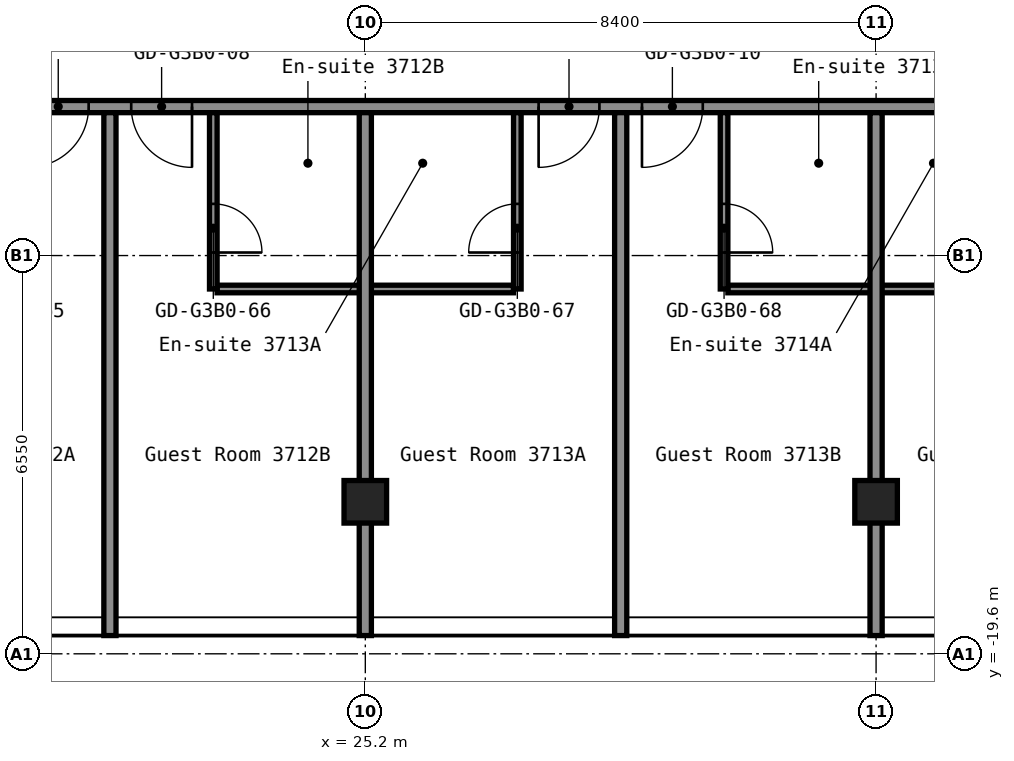
"""IFC4 building model, lengths in metres.
Left out: names, types, materials, properties, quantities, classifications, styles, units other than length and angle.
Written with IfcOpenShell. Run it as: python <this file> out.ifc"""

import sys

from ifc_helpers import new_model, si_unit, direction, frame, frame_2d, origin, origin_2d, place, context, subcontext, project, spatial, rectangle, hollow_rectangle, extrude, element, fill, save


model = new_model("IFC4")
c1 = context("Model", 3, precision=1e-05, world=origin(), true_north=direction((0.0, 1.0)))
c2 = subcontext(c1, "Body", "Model", "MODEL_VIEW")
j1 = project(units=[si_unit("LENGTHUNIT", "METRE"), si_unit("PLANEANGLEUNIT", "RADIAN")], contexts=[c1])
p1 = place(None, origin())
s1 = spatial("IfcSite", under=j1, at=p1, CompositionType="ELEMENT")
p2 = place(p1, origin())
s2 = spatial("IfcBuilding", under=s1, at=p2, CompositionType="ELEMENT")
p3 = place(p2, frame((0.0, 0.0, 134.2)))
s3 = spatial("IfcBuildingStorey", under=s2, at=p3, CompositionType="ELEMENT", Elevation=134.2)
for number, where, z_axis, x_axis in (
    (1, (25.2, -17.1, 0.0), (0.0, 0.0, 1.0), (1.0, 0.0, 0.0)),
    (2, (33.6, -17.1, 0.0), (0.0, 0.0, 1.0), (1.0, 0.0, 0.0)),
):
    element("IfcColumn", number, at=place(p3, frame(where, z_axis=z_axis, x_axis=x_axis)), inside=s3, PredefinedType="COLUMN", context=c2, shape_type="SweptSolid", body=[
        extrude(hollow_rectangle(XDim=0.7, YDim=0.7, WallThickness=0.028, at=origin_2d()), origin(), (0.0, 0.0, 1.0), 2.75),
    ])
for number, where, z_axis, x_axis in (
    (3, (22.762, -13.6, 0.0), (0.0, 0.0, 1.0), (1.0, 0.0, 0.0)),
    (4, (31.163, -13.6, 0.0), (0.0, 0.0, 1.0), (1.0, 0.0, 0.0)),
):
    element("IfcWall", number, at=place(p3, frame(where, z_axis=z_axis, x_axis=x_axis)), inside=s3, PredefinedType="PARTITIONING", context=c2, shape_type="SweptSolid", body=[
        extrude(rectangle(XDim=4.875, YDim=0.125, at=frame_2d((2.438, 0.0))), origin(), (0.0, 0.0, 1.0), 2.75),
    ])
p4 = place(p3, frame((16.8, -10.6, 0.0), z_axis=(0.0, 0.0, 1.0), x_axis=(1.0, 0.0, 0.0)))
e5 = element("IfcWall", 5, at=p4, inside=s3, PredefinedType="PARTITIONING", context=c2, shape_type="SweptSolid", body=[
    extrude(rectangle(XDim=25.9, YDim=0.2, at=frame_2d((12.95, 0.0))), origin(), (0.0, 0.0, 1.0), 2.75),
])
p5 = place(p4, frame((2.85, 0.0, 0.0)))
e6 = element("IfcOpeningElement", 6, at=p5, cuts=e5, PredefinedType="OPENING", context=c2, shape_type="SweptSolid", body=[
    extrude(rectangle(XDim=1.0, YDim=2.1, at=frame_2d((0.5, 1.05))), frame((0.0, 0.11, 0.0), z_axis=(0.0, -1.0, 0.0), x_axis=(1.0, 0.0, 0.0)), (0.0, 0.0, 1.0), 0.22),
])
p6 = place(p4, frame((4.55, 0.0, 0.0)))
e7 = element("IfcOpeningElement", 7, at=p6, cuts=e5, PredefinedType="OPENING", context=c2, shape_type="SweptSolid", body=[
    extrude(rectangle(XDim=1.0, YDim=2.1, at=frame_2d((0.5, 1.05))), frame((0.0, 0.11, 0.0), z_axis=(0.0, -1.0, 0.0), x_axis=(1.0, 0.0, 0.0)), (0.0, 0.0, 1.0), 0.22),
])
p7 = place(p4, frame((11.25, 0.0, 0.0)))
e8 = element("IfcOpeningElement", 8, at=p7, cuts=e5, PredefinedType="OPENING", context=c2, shape_type="SweptSolid", body=[
    extrude(rectangle(XDim=1.0, YDim=2.1, at=frame_2d((0.5, 1.05))), frame((0.0, 0.11, 0.0), z_axis=(0.0, -1.0, 0.0), x_axis=(1.0, 0.0, 0.0)), (0.0, 0.0, 1.0), 0.22),
])
p8 = place(p4, frame((12.95, 0.0, 0.0)))
e9 = element("IfcOpeningElement", 9, at=p8, cuts=e5, PredefinedType="OPENING", context=c2, shape_type="SweptSolid", body=[
    extrude(rectangle(XDim=1.0, YDim=2.1, at=frame_2d((0.5, 1.05))), frame((0.0, 0.11, 0.0), z_axis=(0.0, -1.0, 0.0), x_axis=(1.0, 0.0, 0.0)), (0.0, 0.0, 1.0), 0.22),
])
p9 = place(p4, frame((19.75, 0.0, 0.0)))
e10 = element("IfcOpeningElement", 10, at=p9, cuts=e5, PredefinedType="OPENING", context=c2, shape_type="SweptSolid", body=[
    extrude(rectangle(XDim=1.0, YDim=2.1, at=frame_2d((0.5, 1.05))), frame((0.0, 0.11, 0.0), z_axis=(0.0, -1.0, 0.0), x_axis=(1.0, 0.0, 0.0)), (0.0, 0.0, 1.0), 0.22),
])
p10 = place(p4, frame((21.65, 0.0, 0.0)))
e11 = element("IfcOpeningElement", 11, at=p10, cuts=e5, PredefinedType="OPENING", context=c2, shape_type="SweptSolid", body=[
    extrude(rectangle(XDim=1.0, YDim=2.1, at=frame_2d((0.5, 1.05))), frame((0.0, 0.11, 0.0), z_axis=(0.0, -1.0, 0.0), x_axis=(1.0, 0.0, 0.0)), (0.0, 0.0, 1.0), 0.22),
])
p11 = place(p3, frame((21.0, -19.3, 0.0), z_axis=(0.0, 0.0, 1.0), x_axis=(0.0, 1.0, 0.0)))
e12 = element("IfcWall", 12, at=p11, inside=s3, PredefinedType="PARTITIONING", context=c2, shape_type="SweptSolid", body=[
    extrude(rectangle(XDim=8.6, YDim=0.2, at=frame_2d((4.3, 0.0))), origin(), (0.0, 0.0, 1.0), 2.75),
])
p12 = place(p3, frame((22.7, -13.6, 0.0), z_axis=(0.0, 0.0, 1.0), x_axis=(0.0, 1.0, 0.0)))
e13 = element("IfcWall", 13, at=p12, inside=s3, PredefinedType="PARTITIONING", context=c2, shape_type="SweptSolid", body=[
    extrude(rectangle(XDim=2.9, YDim=0.125, at=frame_2d((1.45, 0.0))), origin(), (0.0, 0.0, 1.0), 2.75),
])
p13 = place(p12, frame((0.6, 0.0, 0.0)))
e14 = element("IfcOpeningElement", 14, at=p13, cuts=e13, PredefinedType="OPENING", context=c2, shape_type="SweptSolid", body=[
    extrude(rectangle(XDim=0.8, YDim=2.1, at=frame_2d((0.4, 1.05))), frame((0.0, 0.073, 0.0), z_axis=(0.0, -1.0, 0.0), x_axis=(1.0, 0.0, 0.0)), (0.0, 0.0, 1.0), 0.145),
])
p14 = place(p3, frame((25.2, -19.3, 0.0), z_axis=(0.0, 0.0, 1.0), x_axis=(0.0, 1.0, 0.0)))
e15 = element("IfcWall", 15, at=p14, inside=s3, PredefinedType="PARTITIONING", context=c2, shape_type="SweptSolid", body=[
    extrude(rectangle(XDim=8.6, YDim=0.2, at=frame_2d((4.3, 0.0))), origin(), (0.0, 0.0, 1.0), 2.75),
])
p15 = place(p3, frame((27.7, -13.6, 0.0), z_axis=(0.0, 0.0, 1.0), x_axis=(0.0, 1.0, 0.0)))
e16 = element("IfcWall", 16, at=p15, inside=s3, PredefinedType="PARTITIONING", context=c2, shape_type="SweptSolid", body=[
    extrude(rectangle(XDim=2.9, YDim=0.125, at=frame_2d((1.45, 0.0))), origin(), (0.0, 0.0, 1.0), 2.75),
])
p16 = place(p15, frame((0.6, 0.0, 0.0)))
e17 = element("IfcOpeningElement", 17, at=p16, cuts=e16, PredefinedType="OPENING", context=c2, shape_type="SweptSolid", body=[
    extrude(rectangle(XDim=0.8, YDim=2.1, at=frame_2d((0.4, 1.05))), frame((0.0, 0.073, 0.0), z_axis=(0.0, -1.0, 0.0), x_axis=(1.0, 0.0, 0.0)), (0.0, 0.0, 1.0), 0.145),
])
p17 = place(p3, frame((29.4, -19.3, 0.0), z_axis=(0.0, 0.0, 1.0), x_axis=(0.0, 1.0, 0.0)))
e18 = element("IfcWall", 18, at=p17, inside=s3, PredefinedType="PARTITIONING", context=c2, shape_type="SweptSolid", body=[
    extrude(rectangle(XDim=8.6, YDim=0.2, at=frame_2d((4.3, 0.0))), origin(), (0.0, 0.0, 1.0), 2.75),
])
p18 = place(p3, frame((31.1, -13.6, 0.0), z_axis=(0.0, 0.0, 1.0), x_axis=(0.0, 1.0, 0.0)))
e19 = element("IfcWall", 19, at=p18, inside=s3, PredefinedType="PARTITIONING", context=c2, shape_type="SweptSolid", body=[
    extrude(rectangle(XDim=2.9, YDim=0.125, at=frame_2d((1.45, 0.0))), origin(), (0.0, 0.0, 1.0), 2.75),
])
p19 = place(p18, frame((0.6, 0.0, 0.0)))
e20 = element("IfcOpeningElement", 20, at=p19, cuts=e19, PredefinedType="OPENING", context=c2, shape_type="SweptSolid", body=[
    extrude(rectangle(XDim=0.8, YDim=2.1, at=frame_2d((0.4, 1.05))), frame((0.0, 0.073, 0.0), z_axis=(0.0, -1.0, 0.0), x_axis=(1.0, 0.0, 0.0)), (0.0, 0.0, 1.0), 0.145),
])
p20 = place(p3, frame((33.6, -19.3, 0.0), z_axis=(0.0, 0.0, 1.0), x_axis=(0.0, 1.0, 0.0)))
e21 = element("IfcWall", 21, at=p20, inside=s3, PredefinedType="PARTITIONING", context=c2, shape_type="SweptSolid", body=[
    extrude(rectangle(XDim=8.6, YDim=0.2, at=frame_2d((4.3, 0.0))), origin(), (0.0, 0.0, 1.0), 2.75),
])
p21 = place(p5, origin())
e22 = element("IfcDoor", 22, at=p21, inside=s3, OperationType="SINGLE_SWING_LEFT", PredefinedType="DOOR", context=c2, shape_type="SweptSolid", body=[
    extrude(rectangle(XDim=1.0, YDim=2.1, at=frame_2d((0.5, 1.05))), frame((0.0, 0.025, 0.0), z_axis=(0.0, -1.0, 0.0), x_axis=(1.0, 0.0, 0.0)), (0.0, 0.0, 1.0), 0.05),
])
fill(e6, e22)
p22 = place(p6, origin())
e23 = element("IfcDoor", 23, at=p22, inside=s3, OperationType="SINGLE_SWING_RIGHT", PredefinedType="DOOR", context=c2, shape_type="SweptSolid", body=[
    extrude(rectangle(XDim=1.0, YDim=2.1, at=frame_2d((0.5, 1.05))), frame((0.0, 0.025, 0.0), z_axis=(0.0, -1.0, 0.0), x_axis=(1.0, 0.0, 0.0)), (0.0, 0.0, 1.0), 0.05),
])
fill(e7, e23)
p23 = place(p7, origin())
e24 = element("IfcDoor", 24, at=p23, inside=s3, OperationType="SINGLE_SWING_LEFT", PredefinedType="DOOR", context=c2, shape_type="SweptSolid", body=[
    extrude(rectangle(XDim=1.0, YDim=2.1, at=frame_2d((0.5, 1.05))), frame((0.0, 0.025, 0.0), z_axis=(0.0, -1.0, 0.0), x_axis=(1.0, 0.0, 0.0)), (0.0, 0.0, 1.0), 0.05),
])
fill(e8, e24)
p24 = place(p8, origin())
e25 = element("IfcDoor", 25, at=p24, inside=s3, OperationType="SINGLE_SWING_LEFT", PredefinedType="DOOR", context=c2, shape_type="SweptSolid", body=[
    extrude(rectangle(XDim=1.0, YDim=2.1, at=frame_2d((0.5, 1.05))), frame((0.0, 0.025, 0.0), z_axis=(0.0, -1.0, 0.0), x_axis=(1.0, 0.0, 0.0)), (0.0, 0.0, 1.0), 0.05),
])
fill(e9, e25)
p25 = place(p13, origin())
e26 = element("IfcDoor", 26, at=p25, inside=s3, OperationType="SINGLE_SWING_LEFT", PredefinedType="DOOR", context=c2, shape_type="SweptSolid", body=[
    extrude(rectangle(XDim=0.8, YDim=2.1, at=frame_2d((0.4, 1.05))), frame((0.0, 0.025, 0.0), z_axis=(0.0, -1.0, 0.0), x_axis=(1.0, 0.0, 0.0)), (0.0, 0.0, 1.0), 0.05),
])
fill(e14, e26)
p26 = place(p16, origin())
e27 = element("IfcDoor", 27, at=p26, inside=s3, OperationType="SINGLE_SWING_RIGHT", PredefinedType="DOOR", context=c2, shape_type="SweptSolid", body=[
    extrude(rectangle(XDim=0.8, YDim=2.1, at=frame_2d((0.4, 1.05))), frame((0.0, 0.025, 0.0), z_axis=(0.0, -1.0, 0.0), x_axis=(1.0, 0.0, 0.0)), (0.0, 0.0, 1.0), 0.05),
])
fill(e17, e27)
p27 = place(p19, origin())
e28 = element("IfcDoor", 28, at=p27, inside=s3, OperationType="SINGLE_SWING_LEFT", PredefinedType="DOOR", context=c2, shape_type="SweptSolid", body=[
    extrude(rectangle(XDim=0.8, YDim=2.1, at=frame_2d((0.4, 1.05))), frame((0.0, 0.025, 0.0), z_axis=(0.0, -1.0, 0.0), x_axis=(1.0, 0.0, 0.0)), (0.0, 0.0, 1.0), 0.05),
])
fill(e20, e28)
save(model, sys.argv[1])
